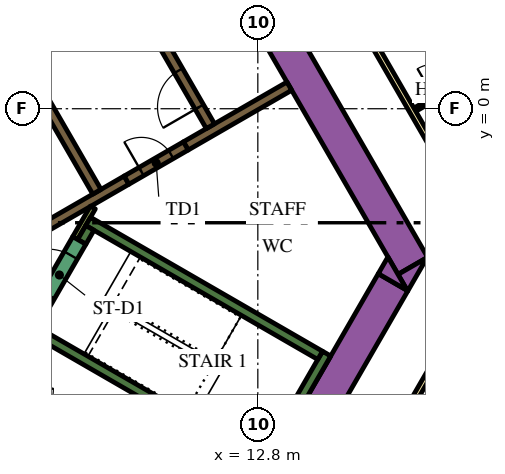
"""IFC4 building model, lengths in metres.
Left out: names, types, materials, properties, quantities, classifications, styles, units other than length and angle.
Written with IfcOpenShell. Run it as: python <this file> out.ifc"""

import sys

from ifc_helpers import new_model, si_unit, direction, frame, frame_2d, origin, place, context, subcontext, project, spatial, polyline, rectangle, outline, extrude, element, fill, save


model = new_model("IFC4")
c1 = context("Model", 3, precision=1e-05, world=origin(), true_north=direction((0.0, 1.0)))
c2 = subcontext(c1, "Body", "Model", "MODEL_VIEW")
j1 = project(units=[si_unit("LENGTHUNIT", "METRE"), si_unit("PLANEANGLEUNIT", "RADIAN")], contexts=[c1])
p1 = place(None, origin())
s1 = spatial("IfcSite", under=j1, at=p1, CompositionType="ELEMENT")
p2 = place(p1, origin())
s2 = spatial("IfcBuilding", under=s1, at=p2, CompositionType="ELEMENT")
p3 = place(p2, frame((0.0, 0.0, 83.7)))
s3 = spatial("IfcBuildingStorey", under=s2, at=p3, CompositionType="ELEMENT", Elevation=83.7)
p4 = place(p3, frame((6.776, 13.364, 0.0), z_axis=(0.0, 0.0, 1.0), x_axis=(0.500004177138, -0.8660229921, 0.0)))
e1 = element("IfcWall", 1, at=p4, inside=s3, PredefinedType="SOLIDWALL", context=c2, shape_type="SweptSolid", body=[
    extrude(rectangle(XDim=20.204, YDim=0.9, at=frame_2d((10.102, 0.0))), origin(), (0.0, 0.0, 1.0), 3.9),
])
p5 = place(p3, origin())
e2 = element("IfcWall", 2, at=p5, inside=s3, PredefinedType="SOLIDWALL", context=c2, shape_type="SweptSolid", body=[
    extrude(outline(polyline([(16.743, -4.8), (16.489, -4.36), (17.251, -3.92), (16.743, -4.8)])), origin(), (0.0, 0.0, 1.0), 3.9),
])
p6 = place(p3, frame((11.695, -12.644, 0.0), z_axis=(0.0, 0.0, 1.0), x_axis=(0.500010229568, 0.86601949766, 0.0)))
e3 = element("IfcWall", 3, at=p6, inside=s3, PredefinedType="SOLIDWALL", context=c2, shape_type="SweptSolid", body=[
    extrude(rectangle(XDim=9.326, YDim=0.9, at=frame_2d((4.663, 0.0))), origin(), (0.0, 0.0, 1.0), 3.9),
])
e4 = element("IfcWall", 4, at=p5, inside=s3, PredefinedType="SOLIDWALL", context=c2, shape_type="SweptSolid", body=[
    extrude(outline(polyline([(16.223, -3.9), (16.732, -4.78), (15.969, -4.34), (16.223, -3.9)])), origin(), (0.0, 0.0, 1.0), 3.9),
])
p7 = place(p3, frame((12.885, -9.431, 0.0), z_axis=(0.0, 0.0, 1.0), x_axis=(0.500020560727, 0.866013532718, 0.0)))
e5 = element("IfcWall", 5, at=p7, inside=s3, PredefinedType="SOLIDWALL", context=c2, shape_type="SweptSolid", body=[
    extrude(rectangle(XDim=3.45, YDim=0.25, at=frame_2d((1.725, 0.0))), origin(), (0.0, 0.0, 1.0), 3.9),
])
p8 = place(p3, frame((12.84, -9.261, 0.0), z_axis=(0.0, 0.0, 1.0), x_axis=(-0.866013990052, 0.500019768644, 0.0)))
e6 = element("IfcWall", 6, at=p8, inside=s3, PredefinedType="SOLIDWALL", context=c2, shape_type="SweptSolid", body=[
    extrude(rectangle(XDim=6.8, YDim=0.25, at=frame_2d((3.4, 0.0))), origin(), (0.0, 0.0, 1.0), 3.9),
])
p9 = place(p3, frame((8.334, -2.964, 0.0), z_axis=(0.0, 0.0, 1.0), x_axis=(0.866016039709, -0.500016218704, 0.0)))
e7 = element("IfcWall", 7, at=p9, inside=s3, PredefinedType="SOLIDWALL", context=c2, shape_type="SweptSolid", body=[
    extrude(rectangle(XDim=7.05, YDim=0.25, at=frame_2d((3.525, 0.0))), origin(), (0.0, 0.0, 1.0), 3.9),
])
p10 = place(p3, frame((8.168, -3.503, 0.0), z_axis=(0.0, 0.0, 1.0), x_axis=(0.49972245349, 0.866185586049, 0.0)))
e8 = element("IfcWall", 8, at=p10, inside=s3, PredefinedType="SOLIDWALL", context=c2, shape_type="SweptSolid", body=[
    extrude(rectangle(XDim=0.425, YDim=0.25, at=frame_2d((0.212, 0.0))), origin(), (0.0, 0.0, 1.0), 3.9),
])
p11 = place(p3, frame((13.629, 0.594, 0.0), z_axis=(0.0, 0.0, 1.0), x_axis=(-0.86602790099, -0.499995674689, 0.0)))
e9 = element("IfcWall", 9, at=p11, inside=s3, PredefinedType="SOLIDWALL", context=c2, shape_type="SweptSolid", body=[
    extrude(rectangle(XDim=3.146, YDim=0.25, at=frame_2d((1.573, 0.0))), origin(), (0.0, 0.0, 1.0), 3.9),
])
p12 = place(p3, frame((6.614, -3.456, 0.0), z_axis=(0.0, 0.0, 1.0), x_axis=(0.86602447079, 0.500001615989, 0.0)))
e10 = element("IfcWall", 10, at=p12, inside=s3, PredefinedType="SOLIDWALL", context=c2, shape_type="SweptSolid", body=[
    extrude(rectangle(XDim=3.154, YDim=0.25, at=frame_2d((1.577, 0.0))), origin(), (0.0, 0.0, 1.0), 3.9),
])
p13 = place(p3, frame((8.459, -2.599, 0.0), z_axis=(0.0, 0.0, 1.0), x_axis=(-0.500041054325, -0.866001699761, 0.0)))
e11 = element("IfcWall", 11, at=p13, inside=s3, PredefinedType="PARTITIONING", context=c2, shape_type="SweptSolid", body=[
    extrude(rectangle(XDim=0.929, YDim=0.15, at=frame_2d((0.464, 0.0))), origin(), (0.0, 0.0, 1.0), 3.9),
])
p14 = place(p3, frame((11.553, -0.46, 0.0), z_axis=(0.0, 0.0, 1.0), x_axis=(-0.500006514828, 0.866021642414, 0.0)))
e12 = element("IfcWall", 12, at=p14, inside=s3, PredefinedType="SOLIDWALL", context=c2, shape_type="SweptSolid", body=[
    extrude(rectangle(XDim=12.35, YDim=0.25, at=frame_2d((6.175, 0.0))), origin(), (0.0, 0.0, 1.0), 3.9),
])
p15 = place(p14, frame((0.585, 0.0, 0.0)))
e13 = element("IfcOpeningElement", 13, at=p15, cuts=e12, PredefinedType="OPENING", context=c2, shape_type="SweptSolid", body=[
    extrude(rectangle(XDim=1.1, YDim=2.1, at=frame_2d((0.55, 1.05))), frame((0.0, 0.135, 0.0), z_axis=(0.0, -1.0, 0.0), x_axis=(1.0, 0.0, 0.0)), (0.0, 0.0, 1.0), 0.27),
])
p16 = place(p14, frame((3.105, 0.0, 0.0)))
e14 = element("IfcOpeningElement", 14, at=p16, cuts=e12, PredefinedType="OPENING", context=c2, shape_type="SweptSolid", body=[
    extrude(rectangle(XDim=1.1, YDim=2.1, at=frame_2d((0.55, 1.05))), frame((0.0, 0.135, 0.0), z_axis=(0.0, -1.0, 0.0), x_axis=(1.0, 0.0, 0.0)), (0.0, 0.0, 1.0), 0.27),
])
p17 = place(p14, frame((5.625, 0.0, 0.0)))
e15 = element("IfcOpeningElement", 15, at=p17, cuts=e12, PredefinedType="OPENING", context=c2, shape_type="SweptSolid", body=[
    extrude(rectangle(XDim=1.1, YDim=2.1, at=frame_2d((0.55, 1.05))), frame((0.0, 0.135, 0.0), z_axis=(0.0, -1.0, 0.0), x_axis=(1.0, 0.0, 0.0)), (0.0, 0.0, 1.0), 0.27),
])
p18 = place(p3, frame((8.565, -2.185, 0.0), z_axis=(0.0, 0.0, 1.0), x_axis=(-0.499997954832, 0.866026584559, 0.0)))
e16 = element("IfcWall", 16, at=p18, inside=s3, PredefinedType="SOLIDWALL", context=c2, shape_type="SweptSolid", body=[
    extrude(rectangle(XDim=12.35, YDim=0.25, at=frame_2d((6.175, 0.0))), origin(), (0.0, 0.0, 1.0), 3.9),
])
p19 = place(p18, frame((5.725, 0.0, 0.0)))
e17 = element("IfcOpeningElement", 17, at=p19, cuts=e16, PredefinedType="OPENING", context=c2, shape_type="SweptSolid", body=[
    extrude(rectangle(XDim=0.9, YDim=2.1, at=frame_2d((0.45, 1.05))), frame((0.0, 0.135, 0.0), z_axis=(0.0, -1.0, 0.0), x_axis=(1.0, 0.0, 0.0)), (0.0, 0.0, 1.0), 0.27),
])
p20 = place(p3, frame((7.053, -5.284, 0.0), z_axis=(0.0, 0.0, 1.0), x_axis=(0.500078061341, 0.865980330357, 0.0)))
e18 = element("IfcWall", 18, at=p20, inside=s3, PredefinedType="SOLIDWALL", context=c2, shape_type="SweptSolid", body=[
    extrude(rectangle(XDim=2.1, YDim=0.4, at=frame_2d((1.05, 0.0))), origin(), (0.0, 0.0, 1.0), 3.9),
])
p21 = place(p20, frame((0.45, 0.0, 0.0)))
e19 = element("IfcOpeningElement", 19, at=p21, cuts=e18, PredefinedType="OPENING", context=c2, shape_type="SweptSolid", body=[
    extrude(rectangle(XDim=1.2, YDim=2.1, at=frame_2d((0.6, 1.05))), frame((0.0, 0.21, 0.0), z_axis=(0.0, -1.0, 0.0), x_axis=(1.0, 0.0, 0.0)), (0.0, 0.0, 1.0), 0.42),
])
p22 = place(p3, frame((9.346, -1.879, 0.0), z_axis=(0.0, 0.0, 1.0), x_axis=(0.866047807691, 0.499961193289, 0.0)))
e20 = element("IfcWall", 20, at=p22, inside=s3, PredefinedType="SOLIDWALL", context=c2, shape_type="SweptSolid", body=[
    extrude(rectangle(XDim=1.8, YDim=0.25, at=frame_2d((0.9, 0.0))), origin(), (0.0, 0.0, 1.0), 3.9),
])
p23 = place(p22, frame((0.45, 0.0, 0.0)))
e21 = element("IfcOpeningElement", 21, at=p23, cuts=e20, PredefinedType="OPENING", context=c2, shape_type="SweptSolid", body=[
    extrude(rectangle(XDim=0.9, YDim=2.1, at=frame_2d((0.45, 1.05))), frame((0.0, 0.135, 0.0), z_axis=(0.0, -1.0, 0.0), x_axis=(1.0, 0.0, 0.0)), (0.0, 0.0, 1.0), 0.27),
])
p24 = place(p3, frame((19.081, -3.9, 0.0), z_axis=(0.0, 0.0, 1.0), x_axis=(-0.499974327079, -0.866040225545, 0.0)))
e22 = element("IfcWall", 22, at=p24, inside=s3, PredefinedType="PARTITIONING", context=c2, shape_type="SweptSolid", body=[
    extrude(rectangle(XDim=5.258, YDim=0.15, at=frame_2d((2.629, 0.0))), origin(), (0.0, 0.0, 1.0), 2.75),
])
p25 = place(p24, frame((0.18, 0.0, 0.0)))
e23 = element("IfcOpeningElement", 23, at=p25, cuts=e22, PredefinedType="OPENING", context=c2, shape_type="SweptSolid", body=[
    extrude(rectangle(XDim=1.0, YDim=2.1, at=frame_2d((0.5, 1.05))), frame((0.0, 0.085, 0.0), z_axis=(0.0, -1.0, 0.0), x_axis=(1.0, 0.0, 0.0)), (0.0, 0.0, 1.0), 0.17),
])
p26 = place(p3, frame((6.163, 18.475, 0.0), z_axis=(0.0, 0.0, 1.0), x_axis=(0.500001317485, -0.866024643133, 0.0)))
e24 = element("IfcWall", 24, at=p26, inside=s3, PredefinedType="PARTITIONING", context=c2, shape_type="SweptSolid", body=[
    extrude(rectangle(XDim=25.767, YDim=0.15, at=frame_2d((12.883, 0.0))), origin(), (0.0, 0.0, 1.0), 2.75),
])
p27 = place(p26, frame((24.241, 0.0, 0.0)))
e25 = element("IfcOpeningElement", 25, at=p27, cuts=e24, PredefinedType="OPENING", context=c2, shape_type="SweptSolid", body=[
    extrude(rectangle(XDim=1.0, YDim=2.1, at=frame_2d((0.5, 1.05))), frame((0.0, 0.085, 0.0), z_axis=(0.0, -1.0, 0.0), x_axis=(1.0, 0.0, 0.0)), (0.0, 0.0, 1.0), 0.17),
])
p28 = place(p26, frame((13.144, 0.0, 0.0)))
e26 = element("IfcOpeningElement", 26, at=p28, cuts=e24, PredefinedType="OPENING", context=c2, shape_type="SweptSolid", body=[
    extrude(rectangle(XDim=1.0, YDim=2.1, at=frame_2d((0.5, 1.05))), frame((0.0, 0.085, 0.0), z_axis=(0.0, -1.0, 0.0), x_axis=(1.0, 0.0, 0.0)), (0.0, 0.0, 1.0), 0.17),
])
p29 = place(p26, frame((10.874, 0.0, 0.0)))
e27 = element("IfcOpeningElement", 27, at=p29, cuts=e24, PredefinedType="OPENING", context=c2, shape_type="SweptSolid", body=[
    extrude(rectangle(XDim=0.9, YDim=2.1, at=frame_2d((0.45, 1.05))), frame((0.0, 0.085, 0.0), z_axis=(0.0, -1.0, 0.0), x_axis=(1.0, 0.0, 0.0)), (0.0, 0.0, 1.0), 0.17),
])
p30 = place(p26, frame((3.718, 0.0, 0.0)))
e28 = element("IfcOpeningElement", 28, at=p30, cuts=e24, PredefinedType="OPENING", context=c2, shape_type="SweptSolid", body=[
    extrude(rectangle(XDim=1.1, YDim=2.1, at=frame_2d((0.55, 1.05))), frame((0.0, 0.085, 0.0), z_axis=(0.0, -1.0, 0.0), x_axis=(1.0, 0.0, 0.0)), (0.0, 0.0, 1.0), 0.17),
])
p31 = place(p26, frame((2.411, 0.0, 0.0)))
e29 = element("IfcOpeningElement", 29, at=p31, cuts=e24, PredefinedType="OPENING", context=c2, shape_type="SweptSolid", body=[
    extrude(rectangle(XDim=1.0, YDim=2.1, at=frame_2d((0.5, 1.05))), frame((0.0, 0.085, 0.0), z_axis=(0.0, -1.0, 0.0), x_axis=(1.0, 0.0, 0.0)), (0.0, 0.0, 1.0), 0.17),
])
p32 = place(p3, frame((16.931, -0.026, 0.0), z_axis=(0.0, 0.0, 1.0), x_axis=(0.866059108428, 0.4999416173, 0.0)))
e30 = element("IfcWall", 30, at=p32, inside=s3, PredefinedType="PARTITIONING", context=c2, shape_type="SweptSolid", body=[
    extrude(rectangle(XDim=2.7, YDim=0.1, at=frame_2d((1.35, 0.0))), origin(), (0.0, 0.0, 1.0), 2.75),
])
p33 = place(p32, frame((0.6, 0.0, 0.0)))
e31 = element("IfcOpeningElement", 31, at=p33, cuts=e30, PredefinedType="OPENING", context=c2, shape_type="SweptSolid", body=[
    extrude(rectangle(XDim=0.9, YDim=2.1, at=frame_2d((0.45, 1.05))), frame((0.0, 0.06, 0.0), z_axis=(0.0, -1.0, 0.0), x_axis=(1.0, 0.0, 0.0)), (0.0, 0.0, 1.0), 0.12),
])
p34 = place(p15, origin())
e32 = element("IfcDoor", 32, at=p34, inside=s3, OperationType="DOUBLE_DOOR_SLIDING", PredefinedType="DOOR", context=c2, shape_type="SweptSolid", body=[
    extrude(rectangle(XDim=1.1, YDim=2.1, at=frame_2d((0.55, 1.05))), frame((0.0, 0.025, 0.0), z_axis=(0.0, -1.0, 0.0), x_axis=(1.0, 0.0, 0.0)), (0.0, 0.0, 1.0), 0.05),
])
fill(e13, e32)
p35 = place(p21, origin())
e33 = element("IfcDoor", 33, at=p35, inside=s3, OperationType="SINGLE_SWING_LEFT", PredefinedType="DOOR", context=c2, shape_type="SweptSolid", body=[
    extrude(rectangle(XDim=1.2, YDim=2.1, at=frame_2d((0.6, 1.05))), frame((0.0, 0.025, 0.0), z_axis=(0.0, -1.0, 0.0), x_axis=(1.0, 0.0, 0.0)), (0.0, 0.0, 1.0), 0.05),
])
fill(e19, e33)
p36 = place(p23, origin())
e34 = element("IfcDoor", 34, at=p36, inside=s3, OperationType="SINGLE_SWING_LEFT", PredefinedType="DOOR", context=c2, shape_type="SweptSolid", body=[
    extrude(rectangle(XDim=0.9, YDim=2.1, at=frame_2d((0.45, 1.05))), frame((0.0, 0.025, 0.0), z_axis=(0.0, -1.0, 0.0), x_axis=(1.0, 0.0, 0.0)), (0.0, 0.0, 1.0), 0.05),
])
fill(e21, e34)
save(model, sys.argv[1])
